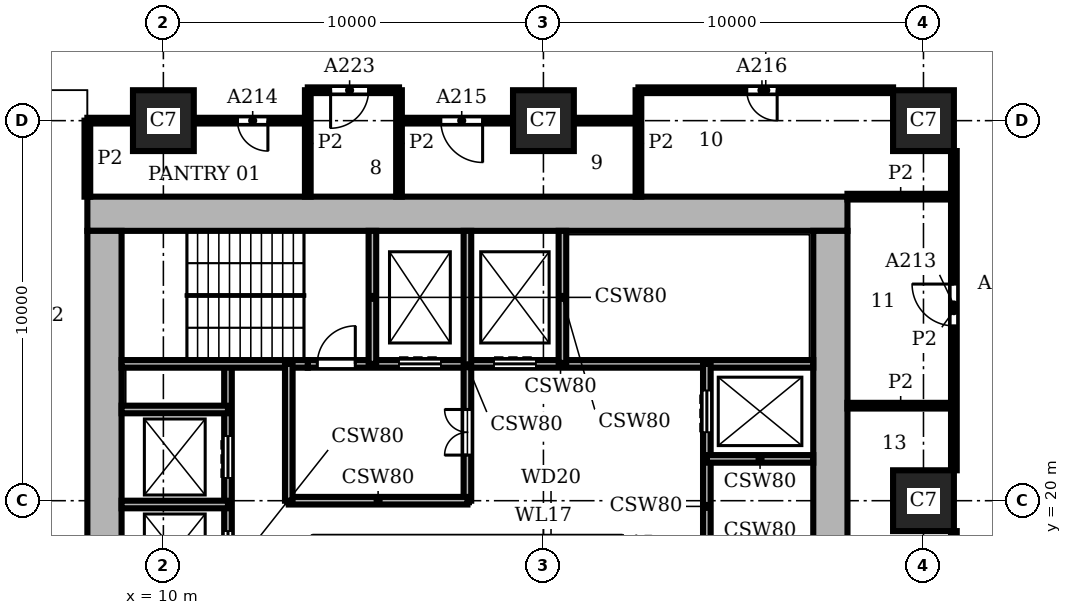
"""IFC4 building model, lengths in metres.
Left out: names, types, materials, properties, quantities, classifications, styles, units other than length and angle.
Written with IfcOpenShell. Run it as: python <this file> out.ifc"""

import sys

from ifc_helpers import new_model, si_unit, direction, frame, frame_2d, origin, origin_2d, place, context, subcontext, project, spatial, rectangle, extrude, element, fill, save


model = new_model("IFC4")
c1 = context("Model", 3, precision=1e-05, world=origin(), true_north=direction((0.0, 1.0)))
c2 = subcontext(c1, "Body", "Model", "MODEL_VIEW")
j1 = project(units=[si_unit("LENGTHUNIT", "METRE"), si_unit("PLANEANGLEUNIT", "RADIAN")], contexts=[c1])
p1 = place(None, origin())
s1 = spatial("IfcSite", under=j1, at=p1, CompositionType="ELEMENT")
p2 = place(p1, origin())
s2 = spatial("IfcBuilding", under=s1, at=p2, CompositionType="ELEMENT")
p3 = place(p2, frame((0.0, 0.0, 23.7)))
s3 = spatial("IfcBuildingStorey", under=s2, at=p3, CompositionType="ELEMENT", Elevation=23.7)
for number, where, z_axis, x_axis in (
    (1, (10.0, 30.0, 0.0), (0.0, 0.0, 1.0), (1.0, 0.0, 0.0)),
    (2, (20.0, 30.0, 0.0), (0.0, 0.0, 1.0), (1.0, 0.0, 0.0)),
    (3, (30.0, 20.0, 0.0), (0.0, 0.0, 1.0), (1.0, 0.0, 0.0)),
    (4, (30.0, 30.0, 0.0), (0.0, 0.0, 1.0), (1.0, 0.0, 0.0)),
):
    element("IfcColumn", number, at=place(p3, frame(where, z_axis=z_axis, x_axis=x_axis)), inside=s3, PredefinedType="COLUMN", context=c2, shape_type="SweptSolid", body=[
        extrude(rectangle(XDim=1.6, YDim=1.6, at=origin_2d()), origin(), (0.0, 0.0, 1.0), 3.9),
    ])
p4 = place(p3, frame((27.55, 8.9, 0.0), z_axis=(0.0, 0.0, 1.0), x_axis=(0.0, 1.0, 0.0)))
e5 = element("IfcWall", 5, at=p4, inside=s3, PredefinedType="SHEAR", context=c2, shape_type="SweptSolid", body=[
    extrude(rectangle(XDim=18.2, YDim=0.9, at=frame_2d((9.1, 0.0))), origin(), (0.0, 0.0, 1.0), 3.9),
])
p5 = place(p4, frame((4.55, 0.0, 0.0)))
e6 = element("IfcOpeningElement", 6, at=p5, cuts=e5, PredefinedType="OPENING", context=c2, shape_type="SweptSolid", body=[
    extrude(rectangle(XDim=1.6, YDim=2.1, at=frame_2d((0.8, 1.05))), frame((0.0, 0.46, 0.0), z_axis=(0.0, -1.0, 0.0), x_axis=(1.0, 0.0, 0.0)), (0.0, 0.0, 1.0), 0.92),
])
p6 = place(p3, frame((28.0, 27.55, 0.0), z_axis=(0.0, 0.0, 1.0), x_axis=(-1.0, 0.0, 0.0)))
e7 = element("IfcWall", 7, at=p6, inside=s3, PredefinedType="SHEAR", context=c2, shape_type="SweptSolid", body=[
    extrude(rectangle(XDim=20.0, YDim=0.9, at=frame_2d((10.0, 0.0))), origin(), (0.0, 0.0, 1.0), 3.9),
])
p7 = place(p3, frame((8.45, 27.1, 0.0), z_axis=(0.0, 0.0, 1.0), x_axis=(0.0, -1.0, 0.0)))
e8 = element("IfcWall", 8, at=p7, inside=s3, PredefinedType="SHEAR", context=c2, shape_type="SweptSolid", body=[
    extrude(rectangle(XDim=18.2, YDim=0.9, at=frame_2d((9.1, 0.0))), origin(), (0.0, 0.0, 1.0), 3.9),
])
p8 = place(p3, frame((8.9, 19.9, 0.0), z_axis=(0.0, 0.0, 1.0), x_axis=(1.0, 0.0, 0.0)))
e9 = element("IfcWall", 9, at=p8, inside=s3, PredefinedType="SHEAR", context=c2, shape_type="SweptSolid", body=[
    extrude(rectangle(XDim=2.8, YDim=0.2, at=frame_2d((1.4, 0.0))), origin(), (0.0, 0.0, 1.0), 3.58),
])
p9 = place(p3, frame((13.3, 20.0, 0.0), z_axis=(0.0, 0.0, 1.0), x_axis=(1.0, 0.0, 0.0)))
e10 = element("IfcWall", 10, at=p9, inside=s3, PredefinedType="SHEAR", context=c2, shape_type="SweptSolid", body=[
    extrude(rectangle(XDim=4.7, YDim=0.2, at=frame_2d((2.35, 0.0))), origin(), (0.0, 0.0, 1.0), 3.58),
])
for number, where, z_axis, x_axis in (
    (11, (24.3, 21.1, 0.0), (0.0, 0.0, 1.0), (1.0, 0.0, 0.0)),
    (12, (8.9, 22.4, 0.0), (0.0, 0.0, 1.0), (1.0, 0.0, 0.0)),
):
    element("IfcWall", number, at=place(p3, frame(where, z_axis=z_axis, x_axis=x_axis)), inside=s3, PredefinedType="SHEAR", context=c2, shape_type="SweptSolid", body=[
        extrude(rectangle(XDim=2.8, YDim=0.2, at=frame_2d((1.4, 0.0))), origin(), (0.0, 0.0, 1.0), 3.58),
    ])
p10 = place(p3, frame((8.9, 23.6, 0.0), z_axis=(0.0, 0.0, 1.0), x_axis=(1.0, 0.0, 0.0)))
e13 = element("IfcWall", 13, at=p10, inside=s3, PredefinedType="SHEAR", context=c2, shape_type="SweptSolid", body=[
    extrude(rectangle(XDim=4.9, YDim=0.2, at=frame_2d((2.45, 0.0))), origin(), (0.0, 0.0, 1.0), 3.58),
])
p11 = place(p3, frame((13.8, 23.6, 0.0), z_axis=(0.0, 0.0, 1.0), x_axis=(1.0, 0.0, 0.0)))
e14 = element("IfcWall", 14, at=p11, inside=s3, PredefinedType="SHEAR", context=c2, shape_type="SweptSolid", body=[
    extrude(rectangle(XDim=13.3, YDim=0.2, at=frame_2d((6.65, 0.0))), origin(), (0.0, 0.0, 1.0), 3.58),
])
p12 = place(p11, frame((2.4, 0.0, 0.0)))
e15 = element("IfcOpeningElement", 15, at=p12, cuts=e14, PredefinedType="OPENING", context=c2, shape_type="SweptSolid", body=[
    extrude(rectangle(XDim=1.1, YDim=2.1, at=frame_2d((0.55, 1.05))), frame((0.0, 0.11, 0.0), z_axis=(0.0, -1.0, 0.0), x_axis=(1.0, 0.0, 0.0)), (0.0, 0.0, 1.0), 0.22),
])
p13 = place(p11, frame((4.9, 0.0, 0.0)))
e16 = element("IfcOpeningElement", 16, at=p13, cuts=e14, PredefinedType="OPENING", context=c2, shape_type="SweptSolid", body=[
    extrude(rectangle(XDim=1.1, YDim=2.1, at=frame_2d((0.55, 1.05))), frame((0.0, 0.11, 0.0), z_axis=(0.0, -1.0, 0.0), x_axis=(1.0, 0.0, 0.0)), (0.0, 0.0, 1.0), 0.22),
])
p14 = place(p11, frame((0.25, 0.0, 0.0)))
e17 = element("IfcOpeningElement", 17, at=p14, cuts=e14, PredefinedType="OPENING", context=c2, shape_type="SweptSolid", body=[
    extrude(rectangle(XDim=1.0, YDim=2.1, at=frame_2d((0.5, 1.05))), frame((0.0, 0.11, 0.0), z_axis=(0.0, -1.0, 0.0), x_axis=(1.0, 0.0, 0.0)), (0.0, 0.0, 1.0), 0.22),
])
p15 = place(p3, frame((11.7, 12.4, 0.0), z_axis=(0.0, 0.0, 1.0), x_axis=(0.0, 1.0, 0.0)))
e18 = element("IfcWall", 18, at=p15, inside=s3, PredefinedType="SHEAR", context=c2, shape_type="SweptSolid", body=[
    extrude(rectangle(XDim=11.2, YDim=0.2, at=frame_2d((5.6, 0.0))), origin(), (0.0, 0.0, 1.0), 3.58),
])
p16 = place(p15, frame((0.7, 0.0, 0.0)))
e19 = element("IfcOpeningElement", 19, at=p16, cuts=e18, PredefinedType="OPENING", context=c2, shape_type="SweptSolid", body=[
    extrude(rectangle(XDim=1.1, YDim=2.1, at=frame_2d((0.55, 1.05))), frame((0.0, 0.11, 0.0), z_axis=(0.0, -1.0, 0.0), x_axis=(1.0, 0.0, 0.0)), (0.0, 0.0, 1.0), 0.22),
])
p17 = place(p15, frame((3.2, 0.0, 0.0)))
e20 = element("IfcOpeningElement", 20, at=p17, cuts=e18, PredefinedType="OPENING", context=c2, shape_type="SweptSolid", body=[
    extrude(rectangle(XDim=1.1, YDim=2.1, at=frame_2d((0.55, 1.05))), frame((0.0, 0.11, 0.0), z_axis=(0.0, -1.0, 0.0), x_axis=(1.0, 0.0, 0.0)), (0.0, 0.0, 1.0), 0.22),
])
p18 = place(p15, frame((5.7, 0.0, 0.0)))
e21 = element("IfcOpeningElement", 21, at=p18, cuts=e18, PredefinedType="OPENING", context=c2, shape_type="SweptSolid", body=[
    extrude(rectangle(XDim=1.1, YDim=2.1, at=frame_2d((0.55, 1.05))), frame((0.0, 0.11, 0.0), z_axis=(0.0, -1.0, 0.0), x_axis=(1.0, 0.0, 0.0)), (0.0, 0.0, 1.0), 0.22),
])
p19 = place(p15, frame((8.2, 0.0, 0.0)))
e22 = element("IfcOpeningElement", 22, at=p19, cuts=e18, PredefinedType="OPENING", context=c2, shape_type="SweptSolid", body=[
    extrude(rectangle(XDim=1.1, YDim=2.1, at=frame_2d((0.55, 1.05))), frame((0.0, 0.11, 0.0), z_axis=(0.0, -1.0, 0.0), x_axis=(1.0, 0.0, 0.0)), (0.0, 0.0, 1.0), 0.22),
])
p20 = place(p3, frame((13.3, 20.0, 0.0), z_axis=(0.0, 0.0, 1.0), x_axis=(0.0, 1.0, 0.0)))
e23 = element("IfcWall", 23, at=p20, inside=s3, PredefinedType="SHEAR", context=c2, shape_type="SweptSolid", body=[
    extrude(rectangle(XDim=3.6, YDim=0.2, at=frame_2d((1.8, 0.0))), origin(), (0.0, 0.0, 1.0), 3.58),
])
p21 = place(p3, frame((15.5, 23.6, 0.0), z_axis=(0.0, 0.0, 1.0), x_axis=(0.0, 1.0, 0.0)))
e24 = element("IfcWall", 24, at=p21, inside=s3, PredefinedType="SHEAR", context=c2, shape_type="SweptSolid", body=[
    extrude(rectangle(XDim=3.5, YDim=0.2, at=frame_2d((1.75, 0.0))), origin(), (0.0, 0.0, 1.0), 3.58),
])
p22 = place(p3, frame((18.0, 20.0, 0.0), z_axis=(0.0, 0.0, 1.0), x_axis=(0.0, 1.0, 0.0)))
e25 = element("IfcWall", 25, at=p22, inside=s3, PredefinedType="SHEAR", context=c2, shape_type="SweptSolid", body=[
    extrude(rectangle(XDim=7.1, YDim=0.2, at=frame_2d((3.55, 0.0))), origin(), (0.0, 0.0, 1.0), 3.58),
])
p23 = place(p22, frame((1.2, 0.0, 0.0)))
e26 = element("IfcOpeningElement", 26, at=p23, cuts=e25, PredefinedType="OPENING", context=c2, shape_type="SweptSolid", body=[
    extrude(rectangle(XDim=1.2, YDim=2.1, at=frame_2d((0.6, 1.05))), frame((0.0, 0.11, 0.0), z_axis=(0.0, -1.0, 0.0), x_axis=(1.0, 0.0, 0.0)), (0.0, 0.0, 1.0), 0.22),
])
p24 = place(p3, frame((20.5, 23.6, 0.0), z_axis=(0.0, 0.0, 1.0), x_axis=(0.0, 1.0, 0.0)))
e27 = element("IfcWall", 27, at=p24, inside=s3, PredefinedType="SHEAR", context=c2, shape_type="SweptSolid", body=[
    extrude(rectangle(XDim=3.5, YDim=0.2, at=frame_2d((1.75, 0.0))), origin(), (0.0, 0.0, 1.0), 3.58),
])
p25 = place(p3, frame((24.3, 16.1, 0.0), z_axis=(0.0, 0.0, 1.0), x_axis=(0.0, 1.0, 0.0)))
e28 = element("IfcWall", 28, at=p25, inside=s3, PredefinedType="SHEAR", context=c2, shape_type="SweptSolid", body=[
    extrude(rectangle(XDim=7.5, YDim=0.2, at=frame_2d((3.75, 0.0))), origin(), (0.0, 0.0, 1.0), 3.58),
])
p26 = place(p25, frame((5.7, 0.0, 0.0)))
e29 = element("IfcOpeningElement", 29, at=p26, cuts=e28, PredefinedType="OPENING", context=c2, shape_type="SweptSolid", body=[
    extrude(rectangle(XDim=1.1, YDim=2.1, at=frame_2d((0.55, 1.05))), frame((0.0, 0.11, 0.0), z_axis=(0.0, -1.0, 0.0), x_axis=(1.0, 0.0, 0.0)), (0.0, 0.0, 1.0), 0.22),
])
p27 = place(p3, frame((8.0, 28.0, 0.0), z_axis=(0.0, 0.0, 1.0), x_axis=(0.0, 1.0, 0.0)))
e30 = element("IfcWall", 30, at=p27, inside=s3, PredefinedType="PARTITIONING", context=c2, shape_type="SweptSolid", body=[
    extrude(rectangle(XDim=2.0, YDim=0.15, at=frame_2d((1.0, 0.0))), origin(), (0.0, 0.0, 1.0), 3.58),
])
for number, where, z_axis, x_axis in (
    (31, (13.8, 28.0, 0.0), (0.0, 0.0, 1.0), (0.0, 1.0, 0.0)),
    (32, (16.2, 28.0, 0.0), (0.0, 0.0, 1.0), (0.0, 1.0, 0.0)),
    (33, (22.5, 28.0, 0.0), (0.0, 0.0, 1.0), (0.0, 1.0, 0.0)),
):
    element("IfcWall", number, at=place(p3, frame(where, z_axis=z_axis, x_axis=x_axis)), inside=s3, PredefinedType="PARTITIONING", context=c2, shape_type="SweptSolid", body=[
        extrude(rectangle(XDim=2.8, YDim=0.15, at=frame_2d((1.4, 0.0))), origin(), (0.0, 0.0, 1.0), 3.58),
    ])
p28 = place(p3, frame((30.8, 15.45, 0.0), z_axis=(0.0, 0.0, 1.0), x_axis=(0.0, 1.0, 0.0)))
e34 = element("IfcWall", 34, at=p28, inside=s3, PredefinedType="PARTITIONING", context=c2, shape_type="SweptSolid", body=[
    extrude(rectangle(XDim=3.75, YDim=0.15, at=frame_2d((1.875, 0.0))), origin(), (0.0, 0.0, 1.0), 3.58),
])
p29 = place(p28, frame((1.35, 0.0, 0.0)))
e35 = element("IfcOpeningElement", 35, at=p29, cuts=e34, PredefinedType="OPENING", context=c2, shape_type="SweptSolid", body=[
    extrude(rectangle(XDim=1.1, YDim=2.1, at=frame_2d((0.55, 1.05))), frame((0.0, 0.085, 0.0), z_axis=(0.0, -1.0, 0.0), x_axis=(1.0, 0.0, 0.0)), (0.0, 0.0, 1.0), 0.17),
])
p30 = place(p3, frame((30.8, 20.8, 0.0), z_axis=(0.0, 0.0, 1.0), x_axis=(0.0, 1.0, 0.0)))
e36 = element("IfcWall", 36, at=p30, inside=s3, PredefinedType="PARTITIONING", context=c2, shape_type="SweptSolid", body=[
    extrude(rectangle(XDim=8.4, YDim=0.15, at=frame_2d((4.2, 0.0))), origin(), (0.0, 0.0, 1.0), 3.58),
])
p31 = place(p30, frame((3.8, 0.0, 0.0)))
e37 = element("IfcOpeningElement", 37, at=p31, cuts=e36, PredefinedType="OPENING", context=c2, shape_type="SweptSolid", body=[
    extrude(rectangle(XDim=1.1, YDim=2.1, at=frame_2d((0.55, 1.05))), frame((0.0, 0.085, 0.0), z_axis=(0.0, -1.0, 0.0), x_axis=(1.0, 0.0, 0.0)), (0.0, 0.0, 1.0), 0.17),
])
for number, where, z_axis, x_axis in (
    (38, (28.0, 22.5, 0.0), (0.0, 0.0, 1.0), (1.0, 0.0, 0.0)),
    (39, (28.0, 28.0, 0.0), (0.0, 0.0, 1.0), (1.0, 0.0, 0.0)),
):
    element("IfcWall", number, at=place(p3, frame(where, z_axis=z_axis, x_axis=x_axis)), inside=s3, PredefinedType="PARTITIONING", context=c2, shape_type="SweptSolid", body=[
        extrude(rectangle(XDim=2.8, YDim=0.15, at=frame_2d((1.4, 0.0))), origin(), (0.0, 0.0, 1.0), 3.58),
    ])
p32 = place(p3, frame((8.0, 30.0, 0.0), z_axis=(0.0, 0.0, 1.0), x_axis=(1.0, 0.0, 0.0)))
e40 = element("IfcWall", 40, at=p32, inside=s3, PredefinedType="PARTITIONING", context=c2, shape_type="SweptSolid", body=[
    extrude(rectangle(XDim=1.2, YDim=0.15, at=frame_2d((0.6, 0.0))), origin(), (0.0, 0.0, 1.0), 3.58),
])
p33 = place(p3, frame((10.8, 30.0, 0.0), z_axis=(0.0, 0.0, 1.0), x_axis=(1.0, 0.0, 0.0)))
e41 = element("IfcWall", 41, at=p33, inside=s3, PredefinedType="PARTITIONING", context=c2, shape_type="SweptSolid", body=[
    extrude(rectangle(XDim=3.0, YDim=0.15, at=frame_2d((1.5, 0.0))), origin(), (0.0, 0.0, 1.0), 3.58),
])
p34 = place(p33, frame((1.15, 0.0, 0.0)))
e42 = element("IfcOpeningElement", 42, at=p34, cuts=e41, PredefinedType="OPENING", context=c2, shape_type="SweptSolid", body=[
    extrude(rectangle(XDim=0.8, YDim=2.1, at=frame_2d((0.4, 1.05))), frame((0.0, 0.085, 0.0), z_axis=(0.0, -1.0, 0.0), x_axis=(1.0, 0.0, 0.0)), (0.0, 0.0, 1.0), 0.17),
])
p35 = place(p3, frame((16.2, 30.0, 0.0), z_axis=(0.0, 0.0, 1.0), x_axis=(1.0, 0.0, 0.0)))
e43 = element("IfcWall", 43, at=p35, inside=s3, PredefinedType="PARTITIONING", context=c2, shape_type="SweptSolid", body=[
    extrude(rectangle(XDim=3.0, YDim=0.15, at=frame_2d((1.5, 0.0))), origin(), (0.0, 0.0, 1.0), 3.58),
])
p36 = place(p35, frame((1.1, 0.0, 0.0)))
e44 = element("IfcOpeningElement", 44, at=p36, cuts=e43, PredefinedType="OPENING", context=c2, shape_type="SweptSolid", body=[
    extrude(rectangle(XDim=1.1, YDim=2.1, at=frame_2d((0.55, 1.05))), frame((0.0, 0.085, 0.0), z_axis=(0.0, -1.0, 0.0), x_axis=(1.0, 0.0, 0.0)), (0.0, 0.0, 1.0), 0.17),
])
p37 = place(p3, frame((20.8, 30.0, 0.0), z_axis=(0.0, 0.0, 1.0), x_axis=(1.0, 0.0, 0.0)))
e45 = element("IfcWall", 45, at=p37, inside=s3, PredefinedType="PARTITIONING", context=c2, shape_type="SweptSolid", body=[
    extrude(rectangle(XDim=1.7, YDim=0.15, at=frame_2d((0.85, 0.0))), origin(), (0.0, 0.0, 1.0), 3.58),
])
p38 = place(p3, frame((13.8, 30.8, 0.0), z_axis=(0.0, 0.0, 1.0), x_axis=(1.0, 0.0, 0.0)))
e46 = element("IfcWall", 46, at=p38, inside=s3, PredefinedType="PARTITIONING", context=c2, shape_type="SweptSolid", body=[
    extrude(rectangle(XDim=2.4, YDim=0.15, at=frame_2d((1.2, 0.0))), origin(), (0.0, 0.0, 1.0), 3.58),
])
p39 = place(p38, frame((0.6, 0.0, 0.0)))
e47 = element("IfcOpeningElement", 47, at=p39, cuts=e46, PredefinedType="OPENING", context=c2, shape_type="SweptSolid", body=[
    extrude(rectangle(XDim=1.0, YDim=2.1, at=frame_2d((0.5, 1.05))), frame((0.0, 0.085, 0.0), z_axis=(0.0, -1.0, 0.0), x_axis=(1.0, 0.0, 0.0)), (0.0, 0.0, 1.0), 0.17),
])
p40 = place(p3, frame((22.5, 30.8, 0.0), z_axis=(0.0, 0.0, 1.0), x_axis=(1.0, 0.0, 0.0)))
e48 = element("IfcWall", 48, at=p40, inside=s3, PredefinedType="PARTITIONING", context=c2, shape_type="SweptSolid", body=[
    extrude(rectangle(XDim=6.7, YDim=0.15, at=frame_2d((3.35, 0.0))), origin(), (0.0, 0.0, 1.0), 3.58),
])
p41 = place(p40, frame((2.85, 0.0, 0.0)))
e49 = element("IfcOpeningElement", 49, at=p41, cuts=e48, PredefinedType="OPENING", context=c2, shape_type="SweptSolid", body=[
    extrude(rectangle(XDim=0.8, YDim=2.1, at=frame_2d((0.4, 1.05))), frame((0.0, 0.085, 0.0), z_axis=(0.0, -1.0, 0.0), x_axis=(1.0, 0.0, 0.0)), (0.0, 0.0, 1.0), 0.17),
])
p42 = place(p18, origin())
e50 = element("IfcDoor", 50, at=p42, inside=s3, OperationType="DOUBLE_DOOR_SLIDING", PredefinedType="DOOR", context=c2, shape_type="SweptSolid", body=[
    extrude(rectangle(XDim=1.1, YDim=2.1, at=frame_2d((0.55, 1.05))), frame((0.0, 0.025, 0.0), z_axis=(0.0, -1.0, 0.0), x_axis=(1.0, 0.0, 0.0)), (0.0, 0.0, 1.0), 0.05),
])
fill(e21, e50)
p43 = place(p19, origin())
e51 = element("IfcDoor", 51, at=p43, inside=s3, OperationType="DOUBLE_DOOR_SLIDING", PredefinedType="DOOR", context=c2, shape_type="SweptSolid", body=[
    extrude(rectangle(XDim=1.1, YDim=2.1, at=frame_2d((0.55, 1.05))), frame((0.0, 0.025, 0.0), z_axis=(0.0, -1.0, 0.0), x_axis=(1.0, 0.0, 0.0)), (0.0, 0.0, 1.0), 0.05),
])
fill(e22, e51)
p44 = place(p26, origin())
e52 = element("IfcDoor", 52, at=p44, inside=s3, OperationType="DOUBLE_DOOR_SLIDING", PredefinedType="DOOR", context=c2, shape_type="SweptSolid", body=[
    extrude(rectangle(XDim=1.1, YDim=2.1, at=frame_2d((0.55, 1.05))), frame((0.0, 0.025, 0.0), z_axis=(0.0, -1.0, 0.0), x_axis=(1.0, 0.0, 0.0)), (0.0, 0.0, 1.0), 0.05),
])
fill(e29, e52)
p45 = place(p12, origin())
e53 = element("IfcDoor", 53, at=p45, inside=s3, OperationType="DOUBLE_DOOR_SLIDING", PredefinedType="DOOR", context=c2, shape_type="SweptSolid", body=[
    extrude(rectangle(XDim=1.1, YDim=2.1, at=frame_2d((0.55, 1.05))), frame((0.0, 0.025, 0.0), z_axis=(0.0, -1.0, 0.0), x_axis=(1.0, 0.0, 0.0)), (0.0, 0.0, 1.0), 0.05),
])
fill(e15, e53)
p46 = place(p13, origin())
e54 = element("IfcDoor", 54, at=p46, inside=s3, OperationType="DOUBLE_DOOR_SLIDING", PredefinedType="DOOR", context=c2, shape_type="SweptSolid", body=[
    extrude(rectangle(XDim=1.1, YDim=2.1, at=frame_2d((0.55, 1.05))), frame((0.0, 0.025, 0.0), z_axis=(0.0, -1.0, 0.0), x_axis=(1.0, 0.0, 0.0)), (0.0, 0.0, 1.0), 0.05),
])
fill(e16, e54)
p47 = place(p14, origin())
e55 = element("IfcDoor", 55, at=p47, inside=s3, OperationType="SINGLE_SWING_RIGHT", PredefinedType="DOOR", context=c2, shape_type="SweptSolid", body=[
    extrude(rectangle(XDim=1.0, YDim=2.1, at=frame_2d((0.5, 1.05))), frame((0.0, 0.025, 0.0), z_axis=(0.0, -1.0, 0.0), x_axis=(1.0, 0.0, 0.0)), (0.0, 0.0, 1.0), 0.05),
])
fill(e17, e55)
p48 = place(p23, origin())
e56 = element("IfcDoor", 56, at=p48, inside=s3, OperationType="DOUBLE_DOOR_SINGLE_SWING", PredefinedType="DOOR", context=c2, shape_type="SweptSolid", body=[
    extrude(rectangle(XDim=1.2, YDim=2.1, at=frame_2d((0.6, 1.05))), frame((0.0, 0.025, 0.0), z_axis=(0.0, -1.0, 0.0), x_axis=(1.0, 0.0, 0.0)), (0.0, 0.0, 1.0), 0.05),
])
fill(e26, e56)
p49 = place(p31, origin())
e57 = element("IfcDoor", 57, at=p49, inside=s3, OperationType="SINGLE_SWING_RIGHT", PredefinedType="DOOR", context=c2, shape_type="SweptSolid", body=[
    extrude(rectangle(XDim=1.1, YDim=2.1, at=frame_2d((0.55, 1.05))), frame((0.0, 0.025, 0.0), z_axis=(0.0, -1.0, 0.0), x_axis=(1.0, 0.0, 0.0)), (0.0, 0.0, 1.0), 0.05),
])
fill(e37, e57)
p50 = place(p34, frame((0.8, 0.0, 0.0), z_axis=(0.0, 0.0, 1.0), x_axis=(-1.0, 0.0, 0.0)))
e58 = element("IfcDoor", 58, at=p50, inside=s3, OperationType="SINGLE_SWING_LEFT", PredefinedType="DOOR", context=c2, shape_type="SweptSolid", body=[
    extrude(rectangle(XDim=0.8, YDim=2.1, at=frame_2d((0.4, 1.05))), frame((0.0, 0.025, 0.0), z_axis=(0.0, -1.0, 0.0), x_axis=(1.0, 0.0, 0.0)), (0.0, 0.0, 1.0), 0.05),
])
fill(e42, e58)
p51 = place(p36, frame((1.1, 0.0, 0.0), z_axis=(0.0, 0.0, 1.0), x_axis=(-1.0, 0.0, 0.0)))
e59 = element("IfcDoor", 59, at=p51, inside=s3, OperationType="SINGLE_SWING_LEFT", PredefinedType="DOOR", context=c2, shape_type="SweptSolid", body=[
    extrude(rectangle(XDim=1.1, YDim=2.1, at=frame_2d((0.55, 1.05))), frame((0.0, 0.025, 0.0), z_axis=(0.0, -1.0, 0.0), x_axis=(1.0, 0.0, 0.0)), (0.0, 0.0, 1.0), 0.05),
])
fill(e44, e59)
p52 = place(p41, frame((0.8, 0.0, 0.0), z_axis=(0.0, 0.0, 1.0), x_axis=(-1.0, 0.0, 0.0)))
e60 = element("IfcDoor", 60, at=p52, inside=s3, OperationType="SINGLE_SWING_LEFT", PredefinedType="DOOR", context=c2, shape_type="SweptSolid", body=[
    extrude(rectangle(XDim=0.8, YDim=2.1, at=frame_2d((0.4, 1.05))), frame((0.0, 0.025, 0.0), z_axis=(0.0, -1.0, 0.0), x_axis=(1.0, 0.0, 0.0)), (0.0, 0.0, 1.0), 0.05),
])
fill(e49, e60)
p53 = place(p39, frame((1.0, 0.0, 0.0), z_axis=(0.0, 0.0, 1.0), x_axis=(-1.0, 0.0, 0.0)))
e61 = element("IfcDoor", 61, at=p53, inside=s3, OperationType="SINGLE_SWING_RIGHT", PredefinedType="DOOR", context=c2, shape_type="SweptSolid", body=[
    extrude(rectangle(XDim=1.0, YDim=2.1, at=frame_2d((0.5, 1.05))), frame((0.0, 0.025, 0.0), z_axis=(0.0, -1.0, 0.0), x_axis=(1.0, 0.0, 0.0)), (0.0, 0.0, 1.0), 0.05),
])
fill(e47, e61)
save(model, sys.argv[1])
